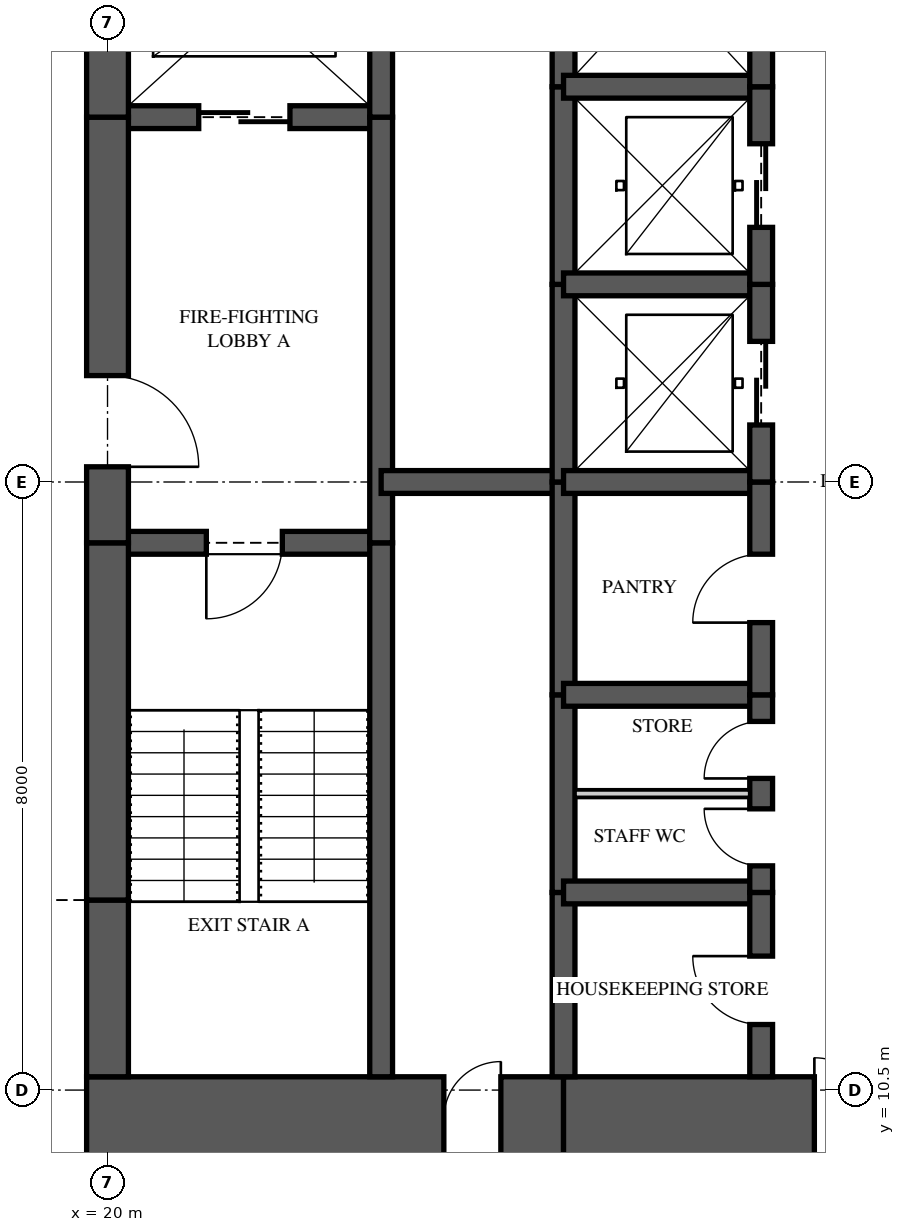
"""IFC4 building model, lengths in metres.
Left out: names, types, materials, properties, quantities, classifications, styles, units other than length and angle.
Written with IfcOpenShell. Run it as: python <this file> out.ifc"""

import sys

from ifc_helpers import new_model, si_unit, direction, frame, frame_2d, origin, place, context, subcontext, project, spatial, rectangle, extrude, element, fill, save


model = new_model("IFC4")
c1 = context("Model", 3, precision=1e-05, world=origin(), true_north=direction((0.0, 1.0)))
c2 = subcontext(c1, "Body", "Model", "MODEL_VIEW")
j1 = project(units=[si_unit("LENGTHUNIT", "METRE"), si_unit("PLANEANGLEUNIT", "RADIAN")], contexts=[c1])
p1 = place(None, origin())
s1 = spatial("IfcSite", under=j1, at=p1, CompositionType="ELEMENT")
p2 = place(p1, origin())
s2 = spatial("IfcBuilding", under=s1, at=p2, CompositionType="ELEMENT")
p3 = place(p2, frame((0.0, 0.0, 221.45)))
s3 = spatial("IfcBuildingStorey", under=s2, at=p3, CompositionType="ELEMENT", Elevation=221.45)
p4 = place(p3, frame((19.725, 10.125, 0.0), z_axis=(0.0, 0.0, 1.0), x_axis=(1.0, 0.0, 0.0)))
e1 = element("IfcWall", 1, at=p4, inside=s3, PredefinedType="SHEAR", context=c2, shape_type="SweptSolid", body=[
    extrude(rectangle(XDim=6.275, YDim=1.1, at=frame_2d((3.137, 0.0))), origin(), (0.0, 0.0, 1.0), 3.5),
])
p5 = place(p4, frame((4.7, 0.0, 0.0)))
e2 = element("IfcOpeningElement", 2, at=p5, cuts=e1, PredefinedType="OPENING", context=c2, shape_type="SweptSolid", body=[
    extrude(rectangle(XDim=0.75, YDim=2.1, at=frame_2d((0.375, 1.05))), frame((0.0, 0.56, 0.0), z_axis=(0.0, -1.0, 0.0), x_axis=(1.0, 0.0, 0.0)), (0.0, 0.0, 1.0), 1.12),
])
p6 = place(p3, frame((26.0, 10.125, 0.0), z_axis=(0.0, 0.0, 1.0), x_axis=(1.0, 0.0, 0.0)))
e3 = element("IfcWall", 3, at=p6, inside=s3, PredefinedType="SHEAR", context=c2, shape_type="SweptSolid", body=[
    extrude(rectangle(XDim=5.6, YDim=1.1, at=frame_2d((2.8, 0.0))), origin(), (0.0, 0.0, 1.0), 3.5),
])
p7 = place(p6, frame((3.3, 0.0, 0.0)))
e4 = element("IfcOpeningElement", 4, at=p7, cuts=e3, PredefinedType="OPENING", context=c2, shape_type="SweptSolid", body=[
    extrude(rectangle(XDim=1.6, YDim=2.1, at=frame_2d((0.8, 1.05))), frame((0.0, 0.56, 0.0), z_axis=(0.0, -1.0, 0.0), x_axis=(1.0, 0.0, 0.0)), (0.0, 0.0, 1.0), 1.12),
])
p8 = place(p3, frame((20.0, 26.325, 0.0), z_axis=(0.0, 0.0, 1.0), x_axis=(0.0, -1.0, 0.0)))
e5 = element("IfcWall", 5, at=p8, inside=s3, PredefinedType="SHEAR", context=c2, shape_type="SweptSolid", body=[
    extrude(rectangle(XDim=3.025, YDim=0.55, at=frame_2d((1.512, 0.0))), origin(), (0.0, 0.0, 1.0), 3.5),
])
p9 = place(p3, frame((20.0, 23.3, 0.0), z_axis=(0.0, 0.0, 1.0), x_axis=(0.0, -1.0, 0.0)))
e6 = element("IfcWall", 6, at=p9, inside=s3, PredefinedType="SHEAR", context=c2, shape_type="SweptSolid", body=[
    extrude(rectangle(XDim=5.6, YDim=0.55, at=frame_2d((2.8, 0.0))), origin(), (0.0, 0.0, 1.0), 3.5),
])
p10 = place(p9, frame((3.4, 0.0, 0.0)))
e7 = element("IfcOpeningElement", 7, at=p10, cuts=e6, PredefinedType="OPENING", context=c2, shape_type="SweptSolid", body=[
    extrude(rectangle(XDim=1.2, YDim=2.2, at=frame_2d((0.6, 1.1))), frame((0.0, 0.285, 0.0), z_axis=(0.0, -1.0, 0.0), x_axis=(1.0, 0.0, 0.0)), (0.0, 0.0, 1.0), 0.57),
])
p11 = place(p3, frame((20.0, 17.7, 0.0), z_axis=(0.0, 0.0, 1.0), x_axis=(0.0, -1.0, 0.0)))
e8 = element("IfcWall", 8, at=p11, inside=s3, PredefinedType="SHEAR", context=c2, shape_type="SweptSolid", body=[
    extrude(rectangle(XDim=4.7, YDim=0.55, at=frame_2d((2.35, 0.0))), origin(), (0.0, 0.0, 1.0), 3.5),
])
p12 = place(p3, frame((20.0, 13.0, 0.0), z_axis=(0.0, 0.0, 1.0), x_axis=(0.0, -1.0, 0.0)))
e9 = element("IfcWall", 9, at=p12, inside=s3, PredefinedType="SHEAR", context=c2, shape_type="SweptSolid", body=[
    extrude(rectangle(XDim=2.325, YDim=0.55, at=frame_2d((1.163, 0.0))), origin(), (0.0, 0.0, 1.0), 3.5),
])
p13 = place(p3, frame((23.6, 10.675, 0.0), z_axis=(0.0, 0.0, 1.0), x_axis=(0.0, 1.0, 0.0)))
e10 = element("IfcWall", 10, at=p13, inside=s3, PredefinedType="SHEAR", context=c2, shape_type="SweptSolid", body=[
    extrude(rectangle(XDim=7.025, YDim=0.3, at=frame_2d((3.512, 0.0))), origin(), (0.0, 0.0, 1.0), 3.5),
])
p14 = place(p3, frame((23.6, 17.7, 0.0), z_axis=(0.0, 0.0, 1.0), x_axis=(0.0, 1.0, 0.0)))
e11 = element("IfcWall", 11, at=p14, inside=s3, PredefinedType="SHEAR", context=c2, shape_type="SweptSolid", body=[
    extrude(rectangle(XDim=5.6, YDim=0.3, at=frame_2d((2.8, 0.0))), origin(), (0.0, 0.0, 1.0), 3.5),
])
p15 = place(p3, frame((23.6, 23.3, 0.0), z_axis=(0.0, 0.0, 1.0), x_axis=(0.0, 1.0, 0.0)))
e12 = element("IfcWall", 12, at=p15, inside=s3, PredefinedType="SHEAR", context=c2, shape_type="SweptSolid", body=[
    extrude(rectangle(XDim=3.025, YDim=0.3, at=frame_2d((1.512, 0.0))), origin(), (0.0, 0.0, 1.0), 3.5),
])
p16 = place(p3, frame((26.0, 10.675, 0.0), z_axis=(0.0, 0.0, 1.0), x_axis=(0.0, 1.0, 0.0)))
e13 = element("IfcWall", 13, at=p16, inside=s3, PredefinedType="SHEAR", context=c2, shape_type="SweptSolid", body=[
    extrude(rectangle(XDim=2.425, YDim=0.3, at=frame_2d((1.212, 0.0))), origin(), (0.0, 0.0, 1.0), 3.5),
])
p17 = place(p3, frame((26.0, 13.1, 0.0), z_axis=(0.0, 0.0, 1.0), x_axis=(0.0, 1.0, 0.0)))
e14 = element("IfcWall", 14, at=p17, inside=s3, PredefinedType="SHEAR", context=c2, shape_type="SweptSolid", body=[
    extrude(rectangle(XDim=2.6, YDim=0.3, at=frame_2d((1.3, 0.0))), origin(), (0.0, 0.0, 1.0), 3.5),
])
p18 = place(p3, frame((26.0, 15.7, 0.0), z_axis=(0.0, 0.0, 1.0), x_axis=(0.0, 1.0, 0.0)))
e15 = element("IfcWall", 15, at=p18, inside=s3, PredefinedType="SHEAR", context=c2, shape_type="SweptSolid", body=[
    extrude(rectangle(XDim=2.8, YDim=0.3, at=frame_2d((1.4, 0.0))), origin(), (0.0, 0.0, 1.0), 3.5),
])
p19 = place(p3, frame((26.0, 18.5, 0.0), z_axis=(0.0, 0.0, 1.0), x_axis=(0.0, 1.0, 0.0)))
e16 = element("IfcWall", 16, at=p19, inside=s3, PredefinedType="SHEAR", context=c2, shape_type="SweptSolid", body=[
    extrude(rectangle(XDim=2.6, YDim=0.3, at=frame_2d((1.3, 0.0))), origin(), (0.0, 0.0, 1.0), 3.5),
])
p20 = place(p3, frame((26.0, 21.1, 0.0), z_axis=(0.0, 0.0, 1.0), x_axis=(0.0, 1.0, 0.0)))
e17 = element("IfcWall", 17, at=p20, inside=s3, PredefinedType="SHEAR", context=c2, shape_type="SweptSolid", body=[
    extrude(rectangle(XDim=2.6, YDim=0.3, at=frame_2d((1.3, 0.0))), origin(), (0.0, 0.0, 1.0), 3.5),
])
p21 = place(p3, frame((26.0, 23.7, 0.0), z_axis=(0.0, 0.0, 1.0), x_axis=(0.0, 1.0, 0.0)))
e18 = element("IfcWall", 18, at=p21, inside=s3, PredefinedType="SHEAR", context=c2, shape_type="SweptSolid", body=[
    extrude(rectangle(XDim=2.625, YDim=0.3, at=frame_2d((1.312, 0.0))), origin(), (0.0, 0.0, 1.0), 3.5),
])
p22 = place(p3, frame((28.6, 10.675, 0.0), z_axis=(0.0, 0.0, 1.0), x_axis=(0.0, 1.0, 0.0)))
e19 = element("IfcWall", 19, at=p22, inside=s3, PredefinedType="SHEAR", context=c2, shape_type="SweptSolid", body=[
    extrude(rectangle(XDim=2.425, YDim=0.3, at=frame_2d((1.212, 0.0))), origin(), (0.0, 0.0, 1.0), 3.5),
])
p23 = place(p22, frame((0.688, 0.0, 0.0)))
e20 = element("IfcOpeningElement", 20, at=p23, cuts=e19, PredefinedType="OPENING", context=c2, shape_type="SweptSolid", body=[
    extrude(rectangle(XDim=0.9, YDim=2.1, at=frame_2d((0.45, 1.05))), frame((0.0, 0.16, 0.0), z_axis=(0.0, -1.0, 0.0), x_axis=(1.0, 0.0, 0.0)), (0.0, 0.0, 1.0), 0.32),
])
p24 = place(p3, frame((28.6, 13.1, 0.0), z_axis=(0.0, 0.0, 1.0), x_axis=(0.0, 1.0, 0.0)))
e21 = element("IfcWall", 21, at=p24, inside=s3, PredefinedType="SHEAR", context=c2, shape_type="SweptSolid", body=[
    extrude(rectangle(XDim=2.6, YDim=0.3, at=frame_2d((1.3, 0.0))), origin(), (0.0, 0.0, 1.0), 3.5),
])
p25 = place(p24, frame((0.35, 0.0, 0.0)))
e22 = element("IfcOpeningElement", 22, at=p25, cuts=e21, PredefinedType="OPENING", context=c2, shape_type="SweptSolid", body=[
    extrude(rectangle(XDim=0.75, YDim=2.1, at=frame_2d((0.375, 1.05))), frame((0.0, 0.16, 0.0), z_axis=(0.0, -1.0, 0.0), x_axis=(1.0, 0.0, 0.0)), (0.0, 0.0, 1.0), 0.32),
])
p26 = place(p24, frame((1.5, 0.0, 0.0)))
e23 = element("IfcOpeningElement", 23, at=p26, cuts=e21, PredefinedType="OPENING", context=c2, shape_type="SweptSolid", body=[
    extrude(rectangle(XDim=0.75, YDim=2.1, at=frame_2d((0.375, 1.05))), frame((0.0, 0.16, 0.0), z_axis=(0.0, -1.0, 0.0), x_axis=(1.0, 0.0, 0.0)), (0.0, 0.0, 1.0), 0.32),
])
p27 = place(p3, frame((28.6, 15.7, 0.0), z_axis=(0.0, 0.0, 1.0), x_axis=(0.0, 1.0, 0.0)))
e24 = element("IfcWall", 24, at=p27, inside=s3, PredefinedType="SHEAR", context=c2, shape_type="SweptSolid", body=[
    extrude(rectangle(XDim=2.8, YDim=0.3, at=frame_2d((1.4, 0.0))), origin(), (0.0, 0.0, 1.0), 3.5),
])
p28 = place(p27, frame((0.95, 0.0, 0.0)))
e25 = element("IfcOpeningElement", 25, at=p28, cuts=e24, PredefinedType="OPENING", context=c2, shape_type="SweptSolid", body=[
    extrude(rectangle(XDim=0.9, YDim=2.1, at=frame_2d((0.45, 1.05))), frame((0.0, 0.16, 0.0), z_axis=(0.0, -1.0, 0.0), x_axis=(1.0, 0.0, 0.0)), (0.0, 0.0, 1.0), 0.32),
])
p29 = place(p3, frame((28.6, 18.5, 0.0), z_axis=(0.0, 0.0, 1.0), x_axis=(0.0, 1.0, 0.0)))
e26 = element("IfcWall", 26, at=p29, inside=s3, PredefinedType="SHEAR", context=c2, shape_type="SweptSolid", body=[
    extrude(rectangle(XDim=2.6, YDim=0.3, at=frame_2d((1.3, 0.0))), origin(), (0.0, 0.0, 1.0), 3.5),
])
p30 = place(p29, frame((0.75, 0.0, 0.0)))
e27 = element("IfcOpeningElement", 27, at=p30, cuts=e26, PredefinedType="OPENING", context=c2, shape_type="SweptSolid", body=[
    extrude(rectangle(XDim=1.1, YDim=2.1, at=frame_2d((0.55, 1.05))), frame((0.0, 0.16, 0.0), z_axis=(0.0, -1.0, 0.0), x_axis=(1.0, 0.0, 0.0)), (0.0, 0.0, 1.0), 0.32),
])
p31 = place(p3, frame((28.6, 21.1, 0.0), z_axis=(0.0, 0.0, 1.0), x_axis=(0.0, 1.0, 0.0)))
e28 = element("IfcWall", 28, at=p31, inside=s3, PredefinedType="SHEAR", context=c2, shape_type="SweptSolid", body=[
    extrude(rectangle(XDim=2.6, YDim=0.3, at=frame_2d((1.3, 0.0))), origin(), (0.0, 0.0, 1.0), 3.5),
])
p32 = place(p31, frame((0.75, 0.0, 0.0)))
e29 = element("IfcOpeningElement", 29, at=p32, cuts=e28, PredefinedType="OPENING", context=c2, shape_type="SweptSolid", body=[
    extrude(rectangle(XDim=1.1, YDim=2.1, at=frame_2d((0.55, 1.05))), frame((0.0, 0.16, 0.0), z_axis=(0.0, -1.0, 0.0), x_axis=(1.0, 0.0, 0.0)), (0.0, 0.0, 1.0), 0.32),
])
p33 = place(p3, frame((28.6, 23.7, 0.0), z_axis=(0.0, 0.0, 1.0), x_axis=(0.0, 1.0, 0.0)))
e30 = element("IfcWall", 30, at=p33, inside=s3, PredefinedType="SHEAR", context=c2, shape_type="SweptSolid", body=[
    extrude(rectangle(XDim=2.625, YDim=0.3, at=frame_2d((1.312, 0.0))), origin(), (0.0, 0.0, 1.0), 3.5),
])
p34 = place(p33, frame((0.85, 0.0, 0.0)))
e31 = element("IfcOpeningElement", 31, at=p34, cuts=e30, PredefinedType="OPENING", context=c2, shape_type="SweptSolid", body=[
    extrude(rectangle(XDim=1.1, YDim=2.1, at=frame_2d((0.55, 1.05))), frame((0.0, 0.16, 0.0), z_axis=(0.0, -1.0, 0.0), x_axis=(1.0, 0.0, 0.0)), (0.0, 0.0, 1.0), 0.32),
])
p35 = place(p3, frame((20.0, 17.7, 0.0), z_axis=(0.0, 0.0, 1.0), x_axis=(1.0, 0.0, 0.0)))
e32 = element("IfcWall", 32, at=p35, inside=s3, PredefinedType="SHEAR", context=c2, shape_type="SweptSolid", body=[
    extrude(rectangle(XDim=3.6, YDim=0.3, at=frame_2d((1.8, 0.0))), origin(), (0.0, 0.0, 1.0), 3.5),
])
p36 = place(p35, frame((1.3, 0.0, 0.0)))
e33 = element("IfcOpeningElement", 33, at=p36, cuts=e32, PredefinedType="OPENING", context=c2, shape_type="SweptSolid", body=[
    extrude(rectangle(XDim=1.0, YDim=2.1, at=frame_2d((0.5, 1.05))), frame((0.0, 0.16, 0.0), z_axis=(0.0, -1.0, 0.0), x_axis=(1.0, 0.0, 0.0)), (0.0, 0.0, 1.0), 0.32),
])
p37 = place(p3, frame((20.0, 23.3, 0.0), z_axis=(0.0, 0.0, 1.0), x_axis=(1.0, 0.0, 0.0)))
e34 = element("IfcWall", 34, at=p37, inside=s3, PredefinedType="SHEAR", context=c2, shape_type="SweptSolid", body=[
    extrude(rectangle(XDim=3.6, YDim=0.3, at=frame_2d((1.8, 0.0))), origin(), (0.0, 0.0, 1.0), 3.5),
])
p38 = place(p37, frame((1.2, 0.0, 0.0)))
e35 = element("IfcOpeningElement", 35, at=p38, cuts=e34, PredefinedType="OPENING", context=c2, shape_type="SweptSolid", body=[
    extrude(rectangle(XDim=1.2, YDim=2.1, at=frame_2d((0.6, 1.05))), frame((0.0, 0.16, 0.0), z_axis=(0.0, -1.0, 0.0), x_axis=(1.0, 0.0, 0.0)), (0.0, 0.0, 1.0), 0.32),
])
p39 = place(p3, frame((23.6, 18.5, 0.0), z_axis=(0.0, 0.0, 1.0), x_axis=(1.0, 0.0, 0.0)))
e36 = element("IfcWall", 36, at=p39, inside=s3, PredefinedType="SHEAR", context=c2, shape_type="SweptSolid", body=[
    extrude(rectangle(XDim=2.4, YDim=0.3, at=frame_2d((1.2, 0.0))), origin(), (0.0, 0.0, 1.0), 3.5),
])
for number, where, z_axis, x_axis in (
    (37, (26.0, 13.1, 0.0), (0.0, 0.0, 1.0), (1.0, 0.0, 0.0)),
    (38, (26.0, 15.7, 0.0), (0.0, 0.0, 1.0), (1.0, 0.0, 0.0)),
    (39, (26.0, 18.5, 0.0), (0.0, 0.0, 1.0), (1.0, 0.0, 0.0)),
    (40, (26.0, 21.1, 0.0), (0.0, 0.0, 1.0), (1.0, 0.0, 0.0)),
    (41, (26.0, 23.7, 0.0), (0.0, 0.0, 1.0), (1.0, 0.0, 0.0)),
):
    element("IfcWall", number, at=place(p3, frame(where, z_axis=z_axis, x_axis=x_axis)), inside=s3, PredefinedType="SHEAR", context=c2, shape_type="SweptSolid", body=[
        extrude(rectangle(XDim=2.6, YDim=0.3, at=frame_2d((1.3, 0.0))), origin(), (0.0, 0.0, 1.0), 3.5),
    ])
p40 = place(p3, frame((26.15, 14.4, 0.0), z_axis=(0.0, 0.0, 1.0), x_axis=(1.0, 0.0, 0.0)))
e42 = element("IfcWall", 42, at=p40, inside=s3, PredefinedType="PARTITIONING", context=c2, shape_type="SweptSolid", body=[
    extrude(rectangle(XDim=2.3, YDim=0.1, at=frame_2d((1.15, 0.0))), origin(), (0.0, 0.0, 1.0), 3.26),
])
p41 = place(p36, frame((1.0, 0.0, 0.0), z_axis=(0.0, 0.0, 1.0), x_axis=(-1.0, 0.0, 0.0)))
e43 = element("IfcDoor", 43, at=p41, inside=s3, OperationType="SINGLE_SWING_RIGHT", PredefinedType="DOOR", context=c2, shape_type="SweptSolid", body=[
    extrude(rectangle(XDim=1.0, YDim=2.1, at=frame_2d((0.5, 1.05))), frame((0.0, 0.025, 0.0), z_axis=(0.0, -1.0, 0.0), x_axis=(1.0, 0.0, 0.0)), (0.0, 0.0, 1.0), 0.05),
])
fill(e33, e43)
p42 = place(p10, origin())
e44 = element("IfcDoor", 44, at=p42, inside=s3, OperationType="SINGLE_SWING_RIGHT", PredefinedType="DOOR", context=c2, shape_type="SweptSolid", body=[
    extrude(rectangle(XDim=1.2, YDim=2.2, at=frame_2d((0.6, 1.1))), frame((0.0, 0.025, 0.0), z_axis=(0.0, -1.0, 0.0), x_axis=(1.0, 0.0, 0.0)), (0.0, 0.0, 1.0), 0.05),
])
fill(e7, e44)
p43 = place(p38, origin())
e45 = element("IfcDoor", 45, at=p43, inside=s3, OperationType="SLIDING_TO_LEFT", PredefinedType="DOOR", context=c2, shape_type="SweptSolid", body=[
    extrude(rectangle(XDim=1.2, YDim=2.1, at=frame_2d((0.6, 1.05))), frame((0.0, 0.025, 0.0), z_axis=(0.0, -1.0, 0.0), x_axis=(1.0, 0.0, 0.0)), (0.0, 0.0, 1.0), 0.05),
])
fill(e35, e45)
p44 = place(p30, origin())
e46 = element("IfcDoor", 46, at=p44, inside=s3, OperationType="SLIDING_TO_LEFT", PredefinedType="DOOR", context=c2, shape_type="SweptSolid", body=[
    extrude(rectangle(XDim=1.1, YDim=2.1, at=frame_2d((0.55, 1.05))), frame((0.0, 0.025, 0.0), z_axis=(0.0, -1.0, 0.0), x_axis=(1.0, 0.0, 0.0)), (0.0, 0.0, 1.0), 0.05),
])
fill(e27, e46)
p45 = place(p32, origin())
e47 = element("IfcDoor", 47, at=p45, inside=s3, OperationType="SLIDING_TO_LEFT", PredefinedType="DOOR", context=c2, shape_type="SweptSolid", body=[
    extrude(rectangle(XDim=1.1, YDim=2.1, at=frame_2d((0.55, 1.05))), frame((0.0, 0.025, 0.0), z_axis=(0.0, -1.0, 0.0), x_axis=(1.0, 0.0, 0.0)), (0.0, 0.0, 1.0), 0.05),
])
fill(e29, e47)
p46 = place(p23, origin())
e48 = element("IfcDoor", 48, at=p46, inside=s3, OperationType="SINGLE_SWING_RIGHT", PredefinedType="DOOR", context=c2, shape_type="SweptSolid", body=[
    extrude(rectangle(XDim=0.9, YDim=2.1, at=frame_2d((0.45, 1.05))), frame((0.0, 0.025, 0.0), z_axis=(0.0, -1.0, 0.0), x_axis=(1.0, 0.0, 0.0)), (0.0, 0.0, 1.0), 0.05),
])
fill(e20, e48)
p47 = place(p25, origin())
e49 = element("IfcDoor", 49, at=p47, inside=s3, OperationType="SINGLE_SWING_RIGHT", PredefinedType="DOOR", context=c2, shape_type="SweptSolid", body=[
    extrude(rectangle(XDim=0.75, YDim=2.1, at=frame_2d((0.375, 1.05))), frame((0.0, 0.025, 0.0), z_axis=(0.0, -1.0, 0.0), x_axis=(1.0, 0.0, 0.0)), (0.0, 0.0, 1.0), 0.05),
])
fill(e22, e49)
p48 = place(p26, origin())
e50 = element("IfcDoor", 50, at=p48, inside=s3, OperationType="SINGLE_SWING_LEFT", PredefinedType="DOOR", context=c2, shape_type="SweptSolid", body=[
    extrude(rectangle(XDim=0.75, YDim=2.1, at=frame_2d((0.375, 1.05))), frame((0.0, 0.025, 0.0), z_axis=(0.0, -1.0, 0.0), x_axis=(1.0, 0.0, 0.0)), (0.0, 0.0, 1.0), 0.05),
])
fill(e23, e50)
p49 = place(p28, origin())
e51 = element("IfcDoor", 51, at=p49, inside=s3, OperationType="SINGLE_SWING_LEFT", PredefinedType="DOOR", context=c2, shape_type="SweptSolid", body=[
    extrude(rectangle(XDim=0.9, YDim=2.1, at=frame_2d((0.45, 1.05))), frame((0.0, 0.025, 0.0), z_axis=(0.0, -1.0, 0.0), x_axis=(1.0, 0.0, 0.0)), (0.0, 0.0, 1.0), 0.05),
])
fill(e25, e51)
p50 = place(p7, origin())
e52 = element("IfcDoor", 52, at=p50, inside=s3, OperationType="DOUBLE_DOOR_SINGLE_SWING", PredefinedType="DOOR", context=c2, shape_type="SweptSolid", body=[
    extrude(rectangle(XDim=1.6, YDim=2.1, at=frame_2d((0.8, 1.05))), frame((0.0, 0.025, 0.0), z_axis=(0.0, -1.0, 0.0), x_axis=(1.0, 0.0, 0.0)), (0.0, 0.0, 1.0), 0.05),
])
fill(e4, e52)
p51 = place(p5, origin())
e53 = element("IfcDoor", 53, at=p51, inside=s3, OperationType="SINGLE_SWING_RIGHT", PredefinedType="DOOR", context=c2, shape_type="SweptSolid", body=[
    extrude(rectangle(XDim=0.75, YDim=2.1, at=frame_2d((0.375, 1.05))), frame((0.0, 0.025, 0.0), z_axis=(0.0, -1.0, 0.0), x_axis=(1.0, 0.0, 0.0)), (0.0, 0.0, 1.0), 0.05),
])
fill(e2, e53)
save(model, sys.argv[1])
